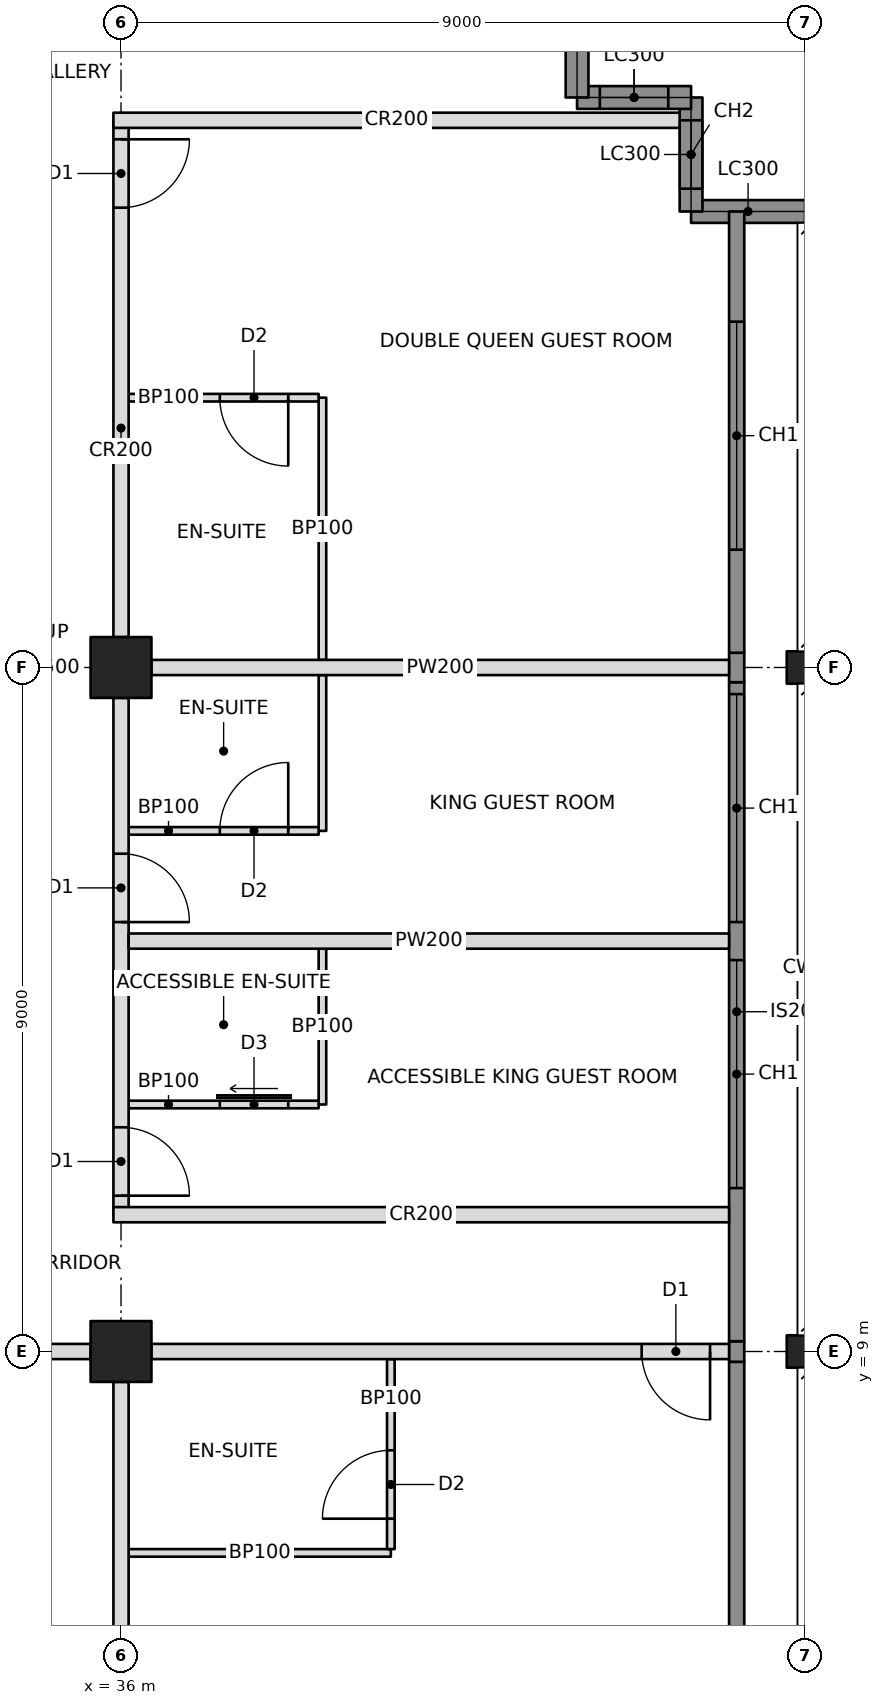
"""IFC4 building model, lengths in metres.
Left out: names, types, materials, properties, quantities, classifications, styles, units other than length and angle.
Written with IfcOpenShell. Run it as: python <this file> out.ifc"""

import sys

from ifc_helpers import new_model, si_unit, direction, frame, frame_2d, origin, origin_2d, place, context, subcontext, project, spatial, rectangle, hollow_rectangle, i_section, extrude, element, fill, save


model = new_model("IFC4")
c1 = context("Model", 3, precision=1e-05, world=origin(), true_north=direction((0.0, 1.0)))
c2 = subcontext(c1, "Body", "Model", "MODEL_VIEW")
j1 = project(units=[si_unit("LENGTHUNIT", "METRE"), si_unit("PLANEANGLEUNIT", "RADIAN")], contexts=[c1])
p1 = place(None, origin())
s1 = spatial("IfcSite", under=j1, at=p1, CompositionType="ELEMENT")
p2 = place(p1, origin())
s2 = spatial("IfcBuilding", under=s1, at=p2, CompositionType="ELEMENT")
p3 = place(p2, frame((0.0, 0.0, 201.2)))
s3 = spatial("IfcBuildingStorey", under=s2, at=p3, CompositionType="ELEMENT", Elevation=201.2)
for number, where, z_axis, x_axis in (
    (1, (36.0, 9.0, 0.0), (0.0, 0.0, 1.0), (0.0, 1.0, 0.0)),
    (2, (36.0, 18.0, 0.0), (0.0, 0.0, 1.0), (0.0, 1.0, 0.0)),
):
    element("IfcColumn", number, at=place(p3, frame(where, z_axis=z_axis, x_axis=x_axis)), inside=s3, PredefinedType="COLUMN", context=c2, shape_type="SweptSolid", body=[
        extrude(hollow_rectangle(XDim=0.8, YDim=0.8, WallThickness=0.05, at=origin_2d()), origin(), (0.0, 0.0, 1.0), 3.4),
    ])
for number, where, z_axis, x_axis in (
    (3, (45.0, 9.0, 0.0), (0.0, 0.0, 1.0), (0.0, 1.0, 0.0)),
    (4, (45.0, 18.0, 0.0), (0.0, 0.0, 1.0), (0.0, 1.0, 0.0)),
):
    element("IfcColumn", number, at=place(p3, frame(where, z_axis=z_axis, x_axis=x_axis)), inside=s3, PredefinedType="COLUMN", context=c2, shape_type="SweptSolid", body=[
        extrude(i_section(OverallWidth=0.427, OverallDepth=0.483, WebThickness=0.051, FlangeThickness=0.082, at=origin_2d()), origin(), (0.0, 0.0, 1.0), 3.4),
    ])
p4 = place(p3, frame((45.0, 24.0, 0.0), z_axis=(0.0, 0.0, 1.0), x_axis=(-1.0, 0.0, 0.0)))
e5 = element("IfcWall", 5, at=p4, inside=s3, PredefinedType="SOLIDWALL", context=c2, shape_type="SweptSolid", body=[
    extrude(rectangle(XDim=1.5, YDim=0.3, at=frame_2d((0.75, 0.0))), origin(), (0.0, 0.0, 1.0), 2.42),
])
p5 = place(p3, frame((43.5, 24.0, 0.0), z_axis=(0.0, 0.0, 1.0), x_axis=(0.0, 1.0, 0.0)))
e6 = element("IfcWall", 6, at=p5, inside=s3, PredefinedType="SOLIDWALL", context=c2, shape_type="SweptSolid", body=[
    extrude(rectangle(XDim=1.5, YDim=0.3, at=frame_2d((0.75, 0.0))), origin(), (0.0, 0.0, 1.0), 3.2),
])
p6 = place(p5, frame((0.3, 0.0, 0.6)))
e7 = element("IfcOpeningElement", 7, at=p6, cuts=e6, PredefinedType="OPENING", context=c2, shape_type="SweptSolid", body=[
    extrude(rectangle(XDim=0.9, YDim=2.2, at=frame_2d((0.45, 1.1))), frame((0.0, 0.16, 0.0), z_axis=(0.0, -1.0, 0.0), x_axis=(1.0, 0.0, 0.0)), (0.0, 0.0, 1.0), 0.32),
])
p7 = place(p3, frame((43.5, 25.5, 0.0), z_axis=(0.0, 0.0, 1.0), x_axis=(-1.0, 0.0, 0.0)))
e8 = element("IfcWall", 8, at=p7, inside=s3, PredefinedType="SOLIDWALL", context=c2, shape_type="SweptSolid", body=[
    extrude(rectangle(XDim=1.5, YDim=0.3, at=frame_2d((0.75, 0.0))), origin(), (0.0, 0.0, 1.0), 3.2),
])
p8 = place(p7, frame((0.3, 0.0, 0.6)))
e9 = element("IfcOpeningElement", 9, at=p8, cuts=e8, PredefinedType="OPENING", context=c2, shape_type="SweptSolid", body=[
    extrude(rectangle(XDim=0.9, YDim=2.2, at=frame_2d((0.45, 1.1))), frame((0.0, 0.16, 0.0), z_axis=(0.0, -1.0, 0.0), x_axis=(1.0, 0.0, 0.0)), (0.0, 0.0, 1.0), 0.32),
])
p9 = place(p3, frame((42.0, 25.5, 0.0), z_axis=(0.0, 0.0, 1.0), x_axis=(0.0, 1.0, 0.0)))
e10 = element("IfcWall", 10, at=p9, inside=s3, PredefinedType="SOLIDWALL", context=c2, shape_type="SweptSolid", body=[
    extrude(rectangle(XDim=1.5, YDim=0.3, at=frame_2d((0.75, 0.0))), origin(), (0.0, 0.0, 1.0), 2.42),
])
p10 = place(p3, frame((27.4, 9.0, 0.0), z_axis=(0.0, 0.0, 1.0), x_axis=(1.0, 0.0, 0.0)))
e11 = element("IfcWall", 11, at=p10, inside=s3, PredefinedType="PARTITIONING", context=c2, shape_type="SweptSolid", body=[
    extrude(rectangle(XDim=8.2, YDim=0.2, at=frame_2d((4.1, 0.0))), origin(), (0.0, 0.0, 1.0), 2.405),
])
p11 = place(p10, frame((0.15, 0.0, 0.0)))
e12 = element("IfcOpeningElement", 12, at=p11, cuts=e11, PredefinedType="OPENING", context=c2, shape_type="SweptSolid", body=[
    extrude(rectangle(XDim=0.9, YDim=2.1, at=frame_2d((0.45, 1.05))), frame((0.0, 0.11, 0.0), z_axis=(0.0, -1.0, 0.0), x_axis=(1.0, 0.0, 0.0)), (0.0, 0.0, 1.0), 0.22),
])
p12 = place(p3, frame((36.4, 9.0, 0.0), z_axis=(0.0, 0.0, 1.0), x_axis=(1.0, 0.0, 0.0)))
e13 = element("IfcWall", 13, at=p12, inside=s3, PredefinedType="PARTITIONING", context=c2, shape_type="SweptSolid", body=[
    extrude(rectangle(XDim=7.6, YDim=0.2, at=frame_2d((3.8, 0.0))), origin(), (0.0, 0.0, 1.0), 2.438),
])
p13 = place(p12, frame((6.45, 0.0, 0.0)))
e14 = element("IfcOpeningElement", 14, at=p13, cuts=e13, PredefinedType="OPENING", context=c2, shape_type="SweptSolid", body=[
    extrude(rectangle(XDim=0.9, YDim=2.1, at=frame_2d((0.45, 1.05))), frame((0.0, 0.11, 0.0), z_axis=(0.0, -1.0, 0.0), x_axis=(1.0, 0.0, 0.0)), (0.0, 0.0, 1.0), 0.22),
])
p14 = place(p3, frame((36.0, 10.8, 0.0), z_axis=(0.0, 0.0, 1.0), x_axis=(0.0, 1.0, 0.0)))
e15 = element("IfcWall", 15, at=p14, inside=s3, PredefinedType="PARTITIONING", context=c2, shape_type="SweptSolid", body=[
    extrude(rectangle(XDim=6.8, YDim=0.2, at=frame_2d((3.4, 0.0))), origin(), (0.0, 0.0, 1.0), 2.405),
])
p15 = place(p14, frame((0.25, 0.0, 0.0)))
e16 = element("IfcOpeningElement", 16, at=p15, cuts=e15, PredefinedType="OPENING", context=c2, shape_type="SweptSolid", body=[
    extrude(rectangle(XDim=0.9, YDim=2.1, at=frame_2d((0.45, 1.05))), frame((0.0, 0.11, 0.0), z_axis=(0.0, -1.0, 0.0), x_axis=(1.0, 0.0, 0.0)), (0.0, 0.0, 1.0), 0.22),
])
p16 = place(p14, frame((3.85, 0.0, 0.0)))
e17 = element("IfcOpeningElement", 17, at=p16, cuts=e15, PredefinedType="OPENING", context=c2, shape_type="SweptSolid", body=[
    extrude(rectangle(XDim=0.9, YDim=2.1, at=frame_2d((0.45, 1.05))), frame((0.0, 0.11, 0.0), z_axis=(0.0, -1.0, 0.0), x_axis=(1.0, 0.0, 0.0)), (0.0, 0.0, 1.0), 0.22),
])
p17 = place(p3, frame((36.0, 18.4, 0.0), z_axis=(0.0, 0.0, 1.0), x_axis=(0.0, 1.0, 0.0)))
e18 = element("IfcWall", 18, at=p17, inside=s3, PredefinedType="PARTITIONING", context=c2, shape_type="SweptSolid", body=[
    extrude(rectangle(XDim=6.8, YDim=0.2, at=frame_2d((3.4, 0.0))), origin(), (0.0, 0.0, 1.0), 2.405),
])
p18 = place(p17, frame((5.65, 0.0, 0.0)))
e19 = element("IfcOpeningElement", 19, at=p18, cuts=e18, PredefinedType="OPENING", context=c2, shape_type="SweptSolid", body=[
    extrude(rectangle(XDim=0.9, YDim=2.1, at=frame_2d((0.45, 1.05))), frame((0.0, 0.11, 0.0), z_axis=(0.0, -1.0, 0.0), x_axis=(1.0, 0.0, 0.0)), (0.0, 0.0, 1.0), 0.22),
])
p19 = place(p3, frame((35.9, 10.8, 0.0), z_axis=(0.0, 0.0, 1.0), x_axis=(1.0, 0.0, 0.0)))
e20 = element("IfcWall", 20, at=p19, inside=s3, PredefinedType="PARTITIONING", context=c2, shape_type="SweptSolid", body=[
    extrude(rectangle(XDim=8.1, YDim=0.2, at=frame_2d((4.05, 0.0))), origin(), (0.0, 0.0, 1.0), 2.404),
])
p20 = place(p3, frame((35.9, 25.2, 0.0), z_axis=(0.0, 0.0, 1.0), x_axis=(1.0, 0.0, 0.0)))
e21 = element("IfcWall", 21, at=p20, inside=s3, PredefinedType="PARTITIONING", context=c2, shape_type="SweptSolid", body=[
    extrude(rectangle(XDim=7.45, YDim=0.2, at=frame_2d((3.725, 0.0))), origin(), (0.0, 0.0, 1.0), 2.404),
])
p21 = place(p3, frame((36.0, 8.6, 0.0), z_axis=(0.0, 0.0, 1.0), x_axis=(0.0, -1.0, 0.0)))
e22 = element("IfcWall", 22, at=p21, inside=s3, PredefinedType="PARTITIONING", context=c2, shape_type="SweptSolid", body=[
    extrude(rectangle(XDim=7.6, YDim=0.2, at=frame_2d((3.8, 0.0))), origin(), (0.0, 0.0, 1.0), 2.438),
])
p22 = place(p3, frame((36.1, 6.35, 0.0), z_axis=(0.0, 0.0, 1.0), x_axis=(1.0, 0.0, 0.0)))
e23 = element("IfcWall", 23, at=p22, inside=s3, PredefinedType="PARTITIONING", context=c2, shape_type="SweptSolid", body=[
    extrude(rectangle(XDim=3.45, YDim=0.1, at=frame_2d((1.725, 0.0))), origin(), (0.0, 0.0, 1.0), 2.438),
])
p23 = place(p3, frame((39.55, 8.9, 0.0), z_axis=(0.0, 0.0, 1.0), x_axis=(0.0, -1.0, 0.0)))
e24 = element("IfcWall", 24, at=p23, inside=s3, PredefinedType="PARTITIONING", context=c2, shape_type="SweptSolid", body=[
    extrude(rectangle(XDim=2.5, YDim=0.1, at=frame_2d((1.25, 0.0))), origin(), (0.0, 0.0, 1.0), 2.438),
])
p24 = place(p23, frame((1.2, 0.0, 0.0)))
e25 = element("IfcOpeningElement", 25, at=p24, cuts=e24, PredefinedType="OPENING", context=c2, shape_type="SweptSolid", body=[
    extrude(rectangle(XDim=0.9, YDim=2.1, at=frame_2d((0.45, 1.05))), frame((0.0, 0.06, 0.0), z_axis=(0.0, -1.0, 0.0), x_axis=(1.0, 0.0, 0.0)), (0.0, 0.0, 1.0), 0.12),
])
p25 = place(p3, frame((36.1, 14.4, 0.0), z_axis=(0.0, 0.0, 1.0), x_axis=(1.0, 0.0, 0.0)))
e26 = element("IfcWall", 26, at=p25, inside=s3, PredefinedType="PARTITIONING", context=c2, shape_type="SweptSolid", body=[
    extrude(rectangle(XDim=7.9, YDim=0.2, at=frame_2d((3.95, 0.0))), origin(), (0.0, 0.0, 1.0), 2.404),
])
p26 = place(p3, frame((36.4, 18.0, 0.0), z_axis=(0.0, 0.0, 1.0), x_axis=(1.0, 0.0, 0.0)))
e27 = element("IfcWall", 27, at=p26, inside=s3, PredefinedType="PARTITIONING", context=c2, shape_type="SweptSolid", body=[
    extrude(rectangle(XDim=7.6, YDim=0.2, at=frame_2d((3.8, 0.0))), origin(), (0.0, 0.0, 1.0), 2.405),
])
p27 = place(p3, frame((38.65, 12.25, 0.0), z_axis=(0.0, 0.0, 1.0), x_axis=(0.0, 1.0, 0.0)))
e28 = element("IfcWall", 28, at=p27, inside=s3, PredefinedType="PARTITIONING", context=c2, shape_type="SweptSolid", body=[
    extrude(rectangle(XDim=2.05, YDim=0.1, at=frame_2d((1.025, 0.0))), origin(), (0.0, 0.0, 1.0), 3.2),
])
p28 = place(p3, frame((36.1, 12.25, 0.0), z_axis=(0.0, 0.0, 1.0), x_axis=(1.0, 0.0, 0.0)))
e29 = element("IfcWall", 29, at=p28, inside=s3, PredefinedType="PARTITIONING", context=c2, shape_type="SweptSolid", body=[
    extrude(rectangle(XDim=2.5, YDim=0.1, at=frame_2d((1.25, 0.0))), origin(), (0.0, 0.0, 1.0), 2.404),
])
p29 = place(p28, frame((1.2, 0.0, 0.0)))
e30 = element("IfcOpeningElement", 30, at=p29, cuts=e29, PredefinedType="OPENING", context=c2, shape_type="SweptSolid", body=[
    extrude(rectangle(XDim=0.9, YDim=2.1, at=frame_2d((0.45, 1.05))), frame((0.0, 0.06, 0.0), z_axis=(0.0, -1.0, 0.0), x_axis=(1.0, 0.0, 0.0)), (0.0, 0.0, 1.0), 0.12),
])
p30 = place(p3, frame((38.65, 15.85, 0.0), z_axis=(0.0, 0.0, 1.0), x_axis=(0.0, 1.0, 0.0)))
e31 = element("IfcWall", 31, at=p30, inside=s3, PredefinedType="PARTITIONING", context=c2, shape_type="SweptSolid", body=[
    extrude(rectangle(XDim=2.05, YDim=0.1, at=frame_2d((1.025, 0.0))), origin(), (0.0, 0.0, 1.0), 2.404),
])
p31 = place(p3, frame((36.1, 15.85, 0.0), z_axis=(0.0, 0.0, 1.0), x_axis=(1.0, 0.0, 0.0)))
e32 = element("IfcWall", 32, at=p31, inside=s3, PredefinedType="PARTITIONING", context=c2, shape_type="SweptSolid", body=[
    extrude(rectangle(XDim=2.5, YDim=0.1, at=frame_2d((1.25, 0.0))), origin(), (0.0, 0.0, 1.0), 2.404),
])
p32 = place(p31, frame((1.2, 0.0, 0.0)))
e33 = element("IfcOpeningElement", 33, at=p32, cuts=e32, PredefinedType="OPENING", context=c2, shape_type="SweptSolid", body=[
    extrude(rectangle(XDim=0.9, YDim=2.1, at=frame_2d((0.45, 1.05))), frame((0.0, 0.06, 0.0), z_axis=(0.0, -1.0, 0.0), x_axis=(1.0, 0.0, 0.0)), (0.0, 0.0, 1.0), 0.12),
])
p33 = place(p3, frame((38.65, 18.1, 0.0), z_axis=(0.0, 0.0, 1.0), x_axis=(0.0, 1.0, 0.0)))
e34 = element("IfcWall", 34, at=p33, inside=s3, PredefinedType="PARTITIONING", context=c2, shape_type="SweptSolid", body=[
    extrude(rectangle(XDim=3.45, YDim=0.1, at=frame_2d((1.725, 0.0))), origin(), (0.0, 0.0, 1.0), 2.404),
])
p34 = place(p3, frame((36.1, 21.55, 0.0), z_axis=(0.0, 0.0, 1.0), x_axis=(1.0, 0.0, 0.0)))
e35 = element("IfcWall", 35, at=p34, inside=s3, PredefinedType="PARTITIONING", context=c2, shape_type="SweptSolid", body=[
    extrude(rectangle(XDim=2.5, YDim=0.1, at=frame_2d((1.25, 0.0))), origin(), (0.0, 0.0, 1.0), 2.404),
])
p35 = place(p34, frame((1.2, 0.0, 0.0)))
e36 = element("IfcOpeningElement", 36, at=p35, cuts=e35, PredefinedType="OPENING", context=c2, shape_type="SweptSolid", body=[
    extrude(rectangle(XDim=0.9, YDim=2.1, at=frame_2d((0.45, 1.05))), frame((0.0, 0.06, 0.0), z_axis=(0.0, -1.0, 0.0), x_axis=(1.0, 0.0, 0.0)), (0.0, 0.0, 1.0), 0.12),
])
p36 = place(p3, frame((44.1, 4.607, 0.0), z_axis=(0.0, 0.0, 1.0), x_axis=(0.0, 1.0, 0.0)))
e37 = element("IfcWall", 37, at=p36, inside=s3, PredefinedType="SOLIDWALL", context=c2, shape_type="SweptSolid", body=[
    extrude(rectangle(XDim=4.257, YDim=0.2, at=frame_2d((2.129, 0.0))), origin(), (0.0, 0.0, 1.0), 3.2),
])
p37 = place(p3, frame((44.1, 8.865, 0.0), z_axis=(0.0, 0.0, 1.0), x_axis=(0.0, 1.0, 0.0)))
e38 = element("IfcWall", 38, at=p37, inside=s3, PredefinedType="SOLIDWALL", context=c2, shape_type="SweptSolid", body=[
    extrude(rectangle(XDim=0.271, YDim=0.2, at=frame_2d((0.135, 0.0))), origin(), (0.0, 0.0, 1.0), 2.438),
])
p38 = place(p3, frame((44.1, 9.135, 0.0), z_axis=(0.0, 0.0, 1.0), x_axis=(0.0, 1.0, 0.0)))
e39 = element("IfcWall", 39, at=p38, inside=s3, PredefinedType="SOLIDWALL", context=c2, shape_type="SweptSolid", body=[
    extrude(rectangle(XDim=8.671, YDim=0.2, at=frame_2d((4.335, 0.0))), origin(), (0.0, 0.0, 1.0), 3.2),
])
p39 = place(p38, frame((2.015, 0.0, 0.6)))
e40 = element("IfcOpeningElement", 40, at=p39, cuts=e39, PredefinedType="OPENING", context=c2, shape_type="SweptSolid", body=[
    extrude(rectangle(XDim=3.0, YDim=2.2, at=frame_2d((1.5, 1.1))), frame((0.0, 0.11, 0.0), z_axis=(0.0, -1.0, 0.0), x_axis=(1.0, 0.0, 0.0)), (0.0, 0.0, 1.0), 0.22),
])
p40 = place(p38, frame((5.515, 0.0, 0.6)))
e41 = element("IfcOpeningElement", 41, at=p40, cuts=e39, PredefinedType="OPENING", context=c2, shape_type="SweptSolid", body=[
    extrude(rectangle(XDim=3.0, YDim=2.2, at=frame_2d((1.5, 1.1))), frame((0.0, 0.11, 0.0), z_axis=(0.0, -1.0, 0.0), x_axis=(1.0, 0.0, 0.0)), (0.0, 0.0, 1.0), 0.22),
])
p41 = place(p3, frame((44.1, 17.806, 0.0), z_axis=(0.0, 0.0, 1.0), x_axis=(0.0, 1.0, 0.0)))
e42 = element("IfcWall", 42, at=p41, inside=s3, PredefinedType="SOLIDWALL", context=c2, shape_type="SweptSolid", body=[
    extrude(rectangle(XDim=0.388, YDim=0.2, at=frame_2d((0.194, 0.0))), origin(), (0.0, 0.0, 1.0), 2.404),
])
p42 = place(p3, frame((44.1, 18.194, 0.0), z_axis=(0.0, 0.0, 1.0), x_axis=(0.0, 1.0, 0.0)))
e43 = element("IfcWall", 43, at=p42, inside=s3, PredefinedType="SOLIDWALL", context=c2, shape_type="SweptSolid", body=[
    extrude(rectangle(XDim=5.806, YDim=0.2, at=frame_2d((2.903, 0.0))), origin(), (0.0, 0.0, 1.0), 3.2),
])
p43 = place(p42, frame((1.356, 0.0, 0.6)))
e44 = element("IfcOpeningElement", 44, at=p43, cuts=e43, PredefinedType="OPENING", context=c2, shape_type="SweptSolid", body=[
    extrude(rectangle(XDim=3.0, YDim=2.2, at=frame_2d((1.5, 1.1))), frame((0.0, 0.11, 0.0), z_axis=(0.0, -1.0, 0.0), x_axis=(1.0, 0.0, 0.0)), (0.0, 0.0, 1.0), 0.22),
])
p44 = place(p6, origin())
e45 = element("IfcWindow", 45, at=p44, inside=s3, PartitioningType="SINGLE_PANEL", PredefinedType="WINDOW", context=c2, shape_type="SweptSolid", body=[
    extrude(rectangle(XDim=0.9, YDim=2.2, at=frame_2d((0.45, 1.1))), frame((0.0, 0.03, 0.0), z_axis=(0.0, -1.0, 0.0), x_axis=(1.0, 0.0, 0.0)), (0.0, 0.0, 1.0), 0.06),
])
fill(e7, e45)
p45 = place(p8, origin())
e46 = element("IfcWindow", 46, at=p45, inside=s3, PartitioningType="SINGLE_PANEL", PredefinedType="WINDOW", context=c2, shape_type="SweptSolid", body=[
    extrude(rectangle(XDim=0.9, YDim=2.2, at=frame_2d((0.45, 1.1))), frame((0.0, 0.03, 0.0), z_axis=(0.0, -1.0, 0.0), x_axis=(1.0, 0.0, 0.0)), (0.0, 0.0, 1.0), 0.06),
])
fill(e9, e46)
p46 = place(p39, origin())
e47 = element("IfcWindow", 47, at=p46, inside=s3, PartitioningType="TRIPLE_PANEL_VERTICAL", PredefinedType="WINDOW", context=c2, shape_type="SweptSolid", body=[
    extrude(rectangle(XDim=3.0, YDim=2.2, at=frame_2d((1.5, 1.1))), frame((0.0, 0.03, 0.0), z_axis=(0.0, -1.0, 0.0), x_axis=(1.0, 0.0, 0.0)), (0.0, 0.0, 1.0), 0.06),
])
fill(e40, e47)
p47 = place(p40, origin())
e48 = element("IfcWindow", 48, at=p47, inside=s3, PartitioningType="TRIPLE_PANEL_VERTICAL", PredefinedType="WINDOW", context=c2, shape_type="SweptSolid", body=[
    extrude(rectangle(XDim=3.0, YDim=2.2, at=frame_2d((1.5, 1.1))), frame((0.0, 0.03, 0.0), z_axis=(0.0, -1.0, 0.0), x_axis=(1.0, 0.0, 0.0)), (0.0, 0.0, 1.0), 0.06),
])
fill(e41, e48)
p48 = place(p43, origin())
e49 = element("IfcWindow", 49, at=p48, inside=s3, PartitioningType="TRIPLE_PANEL_VERTICAL", PredefinedType="WINDOW", context=c2, shape_type="SweptSolid", body=[
    extrude(rectangle(XDim=3.0, YDim=2.2, at=frame_2d((1.5, 1.1))), frame((0.0, 0.03, 0.0), z_axis=(0.0, -1.0, 0.0), x_axis=(1.0, 0.0, 0.0)), (0.0, 0.0, 1.0), 0.06),
])
fill(e44, e49)
p49 = place(p24, frame((0.9, 0.0, 0.0), z_axis=(0.0, 0.0, 1.0), x_axis=(-1.0, 0.0, 0.0)))
e50 = element("IfcDoor", 50, at=p49, inside=s3, OperationType="SINGLE_SWING_LEFT", PredefinedType="DOOR", context=c2, shape_type="SweptSolid", body=[
    extrude(rectangle(XDim=0.9, YDim=2.1, at=frame_2d((0.45, 1.05))), frame((0.0, 0.025, 0.0), z_axis=(0.0, -1.0, 0.0), x_axis=(1.0, 0.0, 0.0)), (0.0, 0.0, 1.0), 0.05),
])
fill(e25, e50)
p50 = place(p13, frame((0.9, 0.0, 0.0), z_axis=(0.0, 0.0, 1.0), x_axis=(-1.0, 0.0, 0.0)))
e51 = element("IfcDoor", 51, at=p50, inside=s3, OperationType="SINGLE_SWING_LEFT", PredefinedType="DOOR", context=c2, shape_type="SweptSolid", body=[
    extrude(rectangle(XDim=0.9, YDim=2.1, at=frame_2d((0.45, 1.05))), frame((0.0, 0.025, 0.0), z_axis=(0.0, -1.0, 0.0), x_axis=(1.0, 0.0, 0.0)), (0.0, 0.0, 1.0), 0.05),
])
fill(e14, e51)
p51 = place(p29, origin())
e52 = element("IfcDoor", 52, at=p51, inside=s3, OperationType="SLIDING_TO_LEFT", PredefinedType="DOOR", context=c2, shape_type="SweptSolid", body=[
    extrude(rectangle(XDim=0.9, YDim=2.1, at=frame_2d((0.45, 1.05))), frame((0.0, 0.025, 0.0), z_axis=(0.0, -1.0, 0.0), x_axis=(1.0, 0.0, 0.0)), (0.0, 0.0, 1.0), 0.05),
])
fill(e30, e52)
p52 = place(p15, frame((0.9, 0.0, 0.0), z_axis=(0.0, 0.0, 1.0), x_axis=(-1.0, 0.0, 0.0)))
e53 = element("IfcDoor", 53, at=p52, inside=s3, OperationType="SINGLE_SWING_RIGHT", PredefinedType="DOOR", context=c2, shape_type="SweptSolid", body=[
    extrude(rectangle(XDim=0.9, YDim=2.1, at=frame_2d((0.45, 1.05))), frame((0.0, 0.025, 0.0), z_axis=(0.0, -1.0, 0.0), x_axis=(1.0, 0.0, 0.0)), (0.0, 0.0, 1.0), 0.05),
])
fill(e16, e53)
p53 = place(p32, origin())
e54 = element("IfcDoor", 54, at=p53, inside=s3, OperationType="SINGLE_SWING_RIGHT", PredefinedType="DOOR", context=c2, shape_type="SweptSolid", body=[
    extrude(rectangle(XDim=0.9, YDim=2.1, at=frame_2d((0.45, 1.05))), frame((0.0, 0.025, 0.0), z_axis=(0.0, -1.0, 0.0), x_axis=(1.0, 0.0, 0.0)), (0.0, 0.0, 1.0), 0.05),
])
fill(e33, e54)
p54 = place(p16, frame((0.9, 0.0, 0.0), z_axis=(0.0, 0.0, 1.0), x_axis=(-1.0, 0.0, 0.0)))
e55 = element("IfcDoor", 55, at=p54, inside=s3, OperationType="SINGLE_SWING_RIGHT", PredefinedType="DOOR", context=c2, shape_type="SweptSolid", body=[
    extrude(rectangle(XDim=0.9, YDim=2.1, at=frame_2d((0.45, 1.05))), frame((0.0, 0.025, 0.0), z_axis=(0.0, -1.0, 0.0), x_axis=(1.0, 0.0, 0.0)), (0.0, 0.0, 1.0), 0.05),
])
fill(e17, e55)
p55 = place(p35, frame((0.9, 0.0, 0.0), z_axis=(0.0, 0.0, 1.0), x_axis=(-1.0, 0.0, 0.0)))
e56 = element("IfcDoor", 56, at=p55, inside=s3, OperationType="SINGLE_SWING_LEFT", PredefinedType="DOOR", context=c2, shape_type="SweptSolid", body=[
    extrude(rectangle(XDim=0.9, YDim=2.1, at=frame_2d((0.45, 1.05))), frame((0.0, 0.025, 0.0), z_axis=(0.0, -1.0, 0.0), x_axis=(1.0, 0.0, 0.0)), (0.0, 0.0, 1.0), 0.05),
])
fill(e36, e56)
p56 = place(p18, frame((0.9, 0.0, 0.0), z_axis=(0.0, 0.0, 1.0), x_axis=(-1.0, 0.0, 0.0)))
e57 = element("IfcDoor", 57, at=p56, inside=s3, OperationType="SINGLE_SWING_LEFT", PredefinedType="DOOR", context=c2, shape_type="SweptSolid", body=[
    extrude(rectangle(XDim=0.9, YDim=2.1, at=frame_2d((0.45, 1.05))), frame((0.0, 0.025, 0.0), z_axis=(0.0, -1.0, 0.0), x_axis=(1.0, 0.0, 0.0)), (0.0, 0.0, 1.0), 0.05),
])
fill(e19, e57)
save(model, sys.argv[1])
